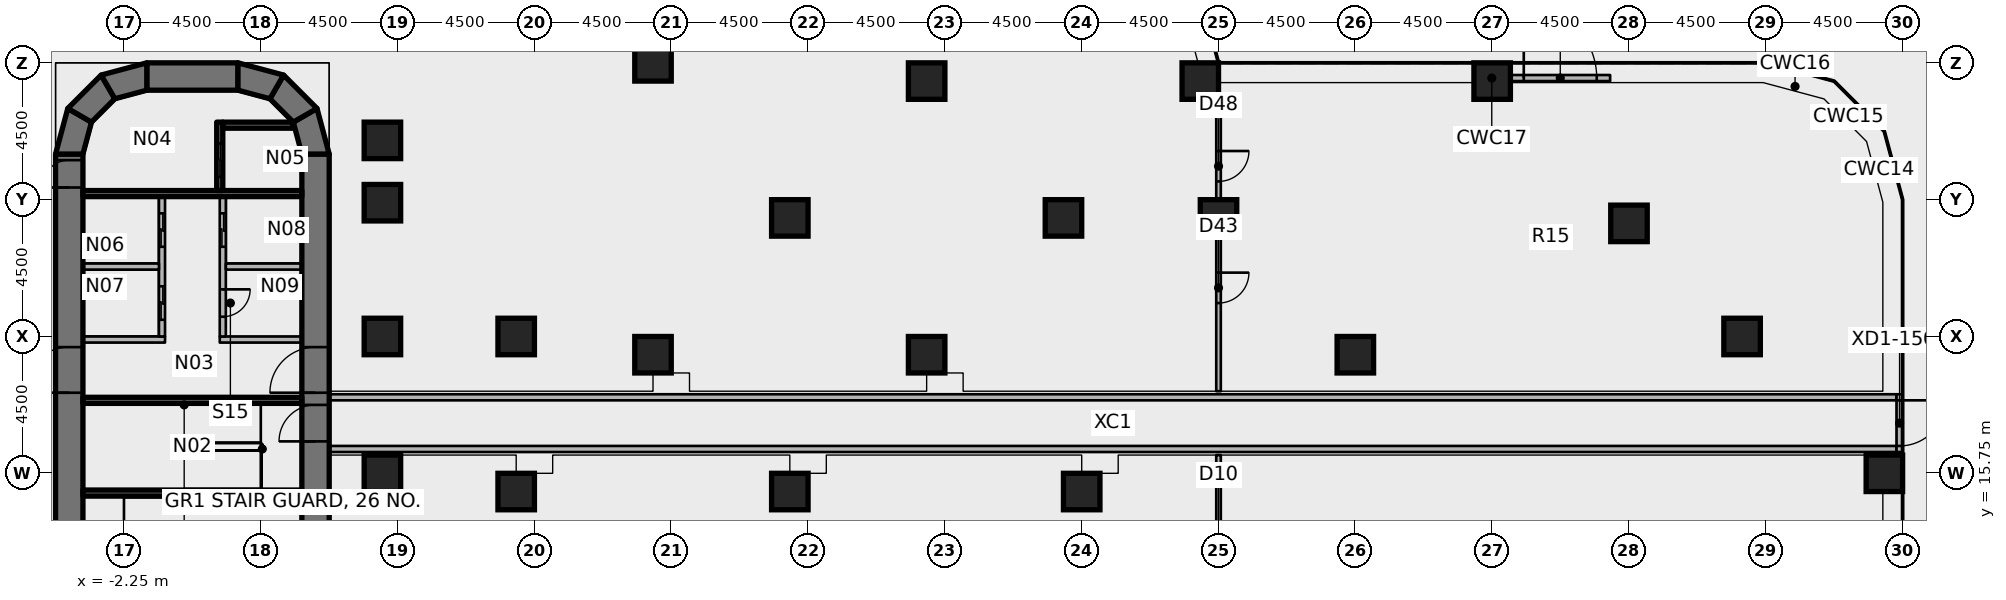
"""IFC4 building model, lengths in metres.
Left out: names, types, materials, properties, quantities, classifications, styles, units other than length and angle.
Written with IfcOpenShell. Run it as: python <this file> out.ifc"""

import sys

from ifc_helpers import new_model, si_unit, direction, frame, frame_2d, origin, origin_2d, place, context, subcontext, project, spatial, polyline, rectangle, outline, extrude, element, fill, save


model = new_model("IFC4")
c1 = context("Model", 3, precision=1e-05, world=origin(), true_north=direction((0.0, 1.0)))
c2 = subcontext(c1, "Body", "Model", "MODEL_VIEW")
j1 = project(units=[si_unit("LENGTHUNIT", "METRE"), si_unit("PLANEANGLEUNIT", "RADIAN")], contexts=[c1])
p1 = place(None, origin())
s1 = spatial("IfcSite", under=j1, at=p1, CompositionType="ELEMENT")
p2 = place(p1, origin())
s2 = spatial("IfcBuilding", under=s1, at=p2, CompositionType="ELEMENT")
p3 = place(p2, origin())
s3 = spatial("IfcBuildingStorey", under=s2, at=p3, CompositionType="ELEMENT", Elevation=0.0)
for number, where, z_axis, x_axis in (
    (1, (6.25, 15.75, 0.0), (0.0, 0.0, 1.0), (1.0, 0.0, 0.0)),
    (2, (6.25, 20.25, 0.0), (0.0, 0.0, 1.0), (1.0, 0.0, 0.0)),
    (3, (6.25, 24.65, 0.0), (0.0, 0.0, 1.0), (1.0, 0.0, 0.0)),
    (4, (6.25, 26.7, 0.0), (0.0, 0.0, 1.0), (1.0, 0.0, 0.0)),
    (5, (10.65, 15.15, 0.0), (0.0, 0.0, 1.0), (1.0, 0.0, 0.0)),
    (6, (10.65, 20.25, 0.0), (0.0, 0.0, 1.0), (1.0, 0.0, 0.0)),
    (7, (15.15, 19.65, 0.0), (0.0, 0.0, 1.0), (1.0, 0.0, 0.0)),
    (8, (15.15, 29.25, 0.0), (0.0, 0.0, 1.0), (1.0, 0.0, 0.0)),
    (9, (19.65, 15.15, 0.0), (0.0, 0.0, 1.0), (1.0, 0.0, 0.0)),
    (10, (19.65, 24.15, 0.0), (0.0, 0.0, 1.0), (1.0, 0.0, 0.0)),
    (11, (24.15, 19.65, 0.0), (0.0, 0.0, 1.0), (1.0, 0.0, 0.0)),
    (12, (24.15, 28.65, 0.0), (0.0, 0.0, 1.0), (1.0, 0.0, 0.0)),
    (13, (29.25, 15.15, 0.0), (0.0, 0.0, 1.0), (1.0, 0.0, 0.0)),
    (14, (28.65, 24.15, 0.0), (0.0, 0.0, 1.0), (1.0, 0.0, 0.0)),
    (15, (33.75, 24.15, 0.0), (0.0, 0.0, 1.0), (1.0, 0.0, 0.0)),
    (16, (33.15, 28.65, 0.0), (0.0, 0.0, 1.0), (1.0, 0.0, 0.0)),
    (17, (38.25, 19.65, 0.0), (0.0, 0.0, 1.0), (1.0, 0.0, 0.0)),
    (18, (42.75, 28.65, 0.0), (0.0, 0.0, 1.0), (1.0, 0.0, 0.0)),
    (19, (47.25, 23.97, 0.0), (0.0, 0.0, 1.0), (1.0, 0.0, 0.0)),
    (20, (50.97, 20.25, 0.0), (0.0, 0.0, 1.0), (1.0, 0.0, 0.0)),
    (21, (55.65, 15.75, 0.0), (0.0, 0.0, 1.0), (1.0, 0.0, 0.0)),
):
    element("IfcColumn", number, at=place(p3, frame(where, z_axis=z_axis, x_axis=x_axis)), inside=s3, PredefinedType="COLUMN", context=c2, shape_type="SweptSolid", body=[
        extrude(rectangle(XDim=1.2, YDim=1.2, at=origin_2d()), origin(), (0.0, 0.0, 1.0), 6.55),
    ])
p4 = place(p3, frame((-4.05, 11.25, 0.0), z_axis=(0.0, 0.0, 1.0), x_axis=(0.0, 1.0, 0.0)))
e22 = element("IfcWall", 22, at=p4, inside=s3, PredefinedType="SHEAR", context=c2, shape_type="SweptSolid", body=[
    extrude(rectangle(XDim=15.0, YDim=0.9, at=frame_2d((7.5, 0.0))), origin(), (0.0, 0.0, 1.0), 7.0),
])
p5 = place(p4, frame((7.15, 0.0, 0.0)))
e23 = element("IfcOpeningElement", 23, at=p5, cuts=e22, PredefinedType="OPENING", context=c2, shape_type="SweptSolid", body=[
    extrude(rectangle(XDim=1.5, YDim=2.3, at=frame_2d((0.75, 1.15))), frame((0.0, 0.46, 0.0), z_axis=(0.0, -1.0, 0.0), x_axis=(1.0, 0.0, 0.0)), (0.0, 0.0, 1.0), 0.92),
])
p6 = place(p4, frame((13.9, 0.0, 0.0)))
e24 = element("IfcOpeningElement", 24, at=p6, cuts=e22, PredefinedType="OPENING", context=c2, shape_type="SweptSolid", body=[
    extrude(rectangle(XDim=0.9, YDim=2.1, at=frame_2d((0.45, 1.05))), frame((0.0, 0.46, 0.0), z_axis=(0.0, -1.0, 0.0), x_axis=(1.0, 0.0, 0.0)), (0.0, 0.0, 1.0), 0.92),
])
p7 = place(p4, frame((1.15, 0.0, 0.0)))
e25 = element("IfcOpeningElement", 25, at=p7, cuts=e22, PredefinedType="OPENING", context=c2, shape_type="SweptSolid", body=[
    extrude(rectangle(XDim=1.2, YDim=2.1, at=frame_2d((0.6, 1.05))), frame((0.0, 0.46, 0.0), z_axis=(0.0, -1.0, 0.0), x_axis=(1.0, 0.0, 0.0)), (0.0, 0.0, 1.0), 0.92),
])
p8 = place(p3, frame((4.05, 11.25, 0.0), z_axis=(0.0, 0.0, 1.0), x_axis=(0.0, 1.0, 0.0)))
e26 = element("IfcWall", 26, at=p8, inside=s3, PredefinedType="SHEAR", context=c2, shape_type="SweptSolid", body=[
    extrude(rectangle(XDim=15.0, YDim=0.9, at=frame_2d((7.5, 0.0))), origin(), (0.0, 0.0, 1.0), 7.0),
])
p9 = place(p8, frame((7.15, 0.0, 0.0)))
e27 = element("IfcOpeningElement", 27, at=p9, cuts=e26, PredefinedType="OPENING", context=c2, shape_type="SweptSolid", body=[
    extrude(rectangle(XDim=1.5, YDim=2.3, at=frame_2d((0.75, 1.15))), frame((0.0, 0.46, 0.0), z_axis=(0.0, -1.0, 0.0), x_axis=(1.0, 0.0, 0.0)), (0.0, 0.0, 1.0), 0.92),
])
p10 = place(p8, frame((5.55, 0.0, 0.0)))
e28 = element("IfcOpeningElement", 28, at=p10, cuts=e26, PredefinedType="OPENING", context=c2, shape_type="SweptSolid", body=[
    extrude(rectangle(XDim=1.2, YDim=2.1, at=frame_2d((0.6, 1.05))), frame((0.0, 0.46, 0.0), z_axis=(0.0, -1.0, 0.0), x_axis=(1.0, 0.0, 0.0)), (0.0, 0.0, 1.0), 0.92),
])
p11 = place(p3, frame((-1.5, 28.8, 0.0), z_axis=(0.0, 0.0, 1.0), x_axis=(1.0, 0.0, 0.0)))
e29 = element("IfcWall", 29, at=p11, inside=s3, PredefinedType="SHEAR", context=c2, shape_type="SweptSolid", body=[
    extrude(rectangle(XDim=3.0, YDim=0.9, at=frame_2d((1.5, 0.0))), origin(), (0.0, 0.0, 1.0), 7.0),
])
p12 = place(p3, origin())
e30 = element("IfcWall", 30, at=p12, inside=s3, PredefinedType="SHEAR", context=c2, shape_type="SweptSolid", body=[
    extrude(outline(polyline([(-4.5, 26.25), (-4.098, 27.75), (-3.319, 27.3), (-3.6, 26.25), (-4.5, 26.25)])), origin(), (0.0, 0.0, 1.0), 7.0),
])
p13 = place(p3, origin())
e31 = element("IfcWall", 31, at=p13, inside=s3, PredefinedType="SHEAR", context=c2, shape_type="SweptSolid", body=[
    extrude(outline(polyline([(-4.098, 27.75), (-3.0, 28.848), (-2.55, 28.069), (-3.319, 27.3), (-4.098, 27.75)])), origin(), (0.0, 0.0, 1.0), 7.0),
])
p14 = place(p3, origin())
e32 = element("IfcWall", 32, at=p14, inside=s3, PredefinedType="SHEAR", context=c2, shape_type="SweptSolid", body=[
    extrude(outline(polyline([(-3.0, 28.848), (-1.5, 29.25), (-1.5, 28.35), (-2.55, 28.069), (-3.0, 28.848)])), origin(), (0.0, 0.0, 1.0), 7.0),
])
p15 = place(p3, origin())
e33 = element("IfcWall", 33, at=p15, inside=s3, PredefinedType="SHEAR", context=c2, shape_type="SweptSolid", body=[
    extrude(outline(polyline([(4.5, 26.25), (4.098, 27.75), (3.319, 27.3), (3.6, 26.25), (4.5, 26.25)])), origin(), (0.0, 0.0, 1.0), 7.0),
])
p16 = place(p3, origin())
e34 = element("IfcWall", 34, at=p16, inside=s3, PredefinedType="SHEAR", context=c2, shape_type="SweptSolid", body=[
    extrude(outline(polyline([(4.098, 27.75), (3.0, 28.848), (2.55, 28.069), (3.319, 27.3), (4.098, 27.75)])), origin(), (0.0, 0.0, 1.0), 7.0),
])
p17 = place(p3, origin())
e35 = element("IfcWall", 35, at=p17, inside=s3, PredefinedType="SHEAR", context=c2, shape_type="SweptSolid", body=[
    extrude(outline(polyline([(3.0, 28.848), (1.5, 29.25), (1.5, 28.35), (2.55, 28.069), (3.0, 28.848)])), origin(), (0.0, 0.0, 1.0), 7.0),
])
p18 = place(p3, frame((43.35, 28.75, 0.0), z_axis=(0.0, 0.0, 1.0), x_axis=(1.0, 0.0, 0.0)))
e36 = element("IfcWall", 36, at=p18, inside=s3, PredefinedType="SOLIDWALL", context=c2, shape_type="SweptSolid", body=[
    extrude(rectangle(XDim=3.28, YDim=0.2, at=frame_2d((1.64, 0.0))), origin(), (0.0, 0.0, 1.0), 5.6),
])
p19 = place(p18, frame((0.44, 0.0, 0.0)))
e37 = element("IfcOpeningElement", 37, at=p19, cuts=e36, PredefinedType="OPENING", context=c2, shape_type="SweptSolid", body=[
    extrude(rectangle(XDim=2.4, YDim=2.7, at=frame_2d((1.2, 1.35))), frame((0.0, 0.11, 0.0), z_axis=(0.0, -1.0, 0.0), x_axis=(1.0, 0.0, 0.0)), (0.0, 0.0, 1.0), 0.22),
])
p20 = place(p3, frame((-3.6, 24.95, 0.0), z_axis=(0.0, 0.0, 1.0), x_axis=(1.0, 0.0, 0.0)))
e38 = element("IfcWall", 38, at=p20, inside=s3, PredefinedType="SHEAR", context=c2, shape_type="SweptSolid", body=[
    extrude(rectangle(XDim=7.2, YDim=0.2, at=frame_2d((3.6, 0.0))), origin(), (0.0, 0.0, 1.0), 6.55),
])
p21 = place(p3, frame((0.9, 27.3, 0.0), z_axis=(0.0, 0.0, 1.0), x_axis=(0.0, -1.0, 0.0)))
e39 = element("IfcWall", 39, at=p21, inside=s3, PredefinedType="SHEAR", context=c2, shape_type="SweptSolid", body=[
    extrude(rectangle(XDim=2.25, YDim=0.2, at=frame_2d((1.125, 0.0))), origin(), (0.0, 0.0, 1.0), 6.55),
])
p22 = place(p21, frame((0.7, 0.0, 0.0)))
e40 = element("IfcOpeningElement", 40, at=p22, cuts=e39, PredefinedType="OPENING", context=c2, shape_type="SweptSolid", body=[
    extrude(rectangle(XDim=1.1, YDim=2.3, at=frame_2d((0.55, 1.15))), frame((0.0, 0.11, 0.0), z_axis=(0.0, -1.0, 0.0), x_axis=(1.0, 0.0, 0.0)), (0.0, 0.0, 1.0), 0.22),
])
p23 = place(p3, origin())
e41 = element("IfcWall", 41, at=p23, inside=s3, PredefinedType="SHEAR", context=c2, shape_type="SweptSolid", body=[
    extrude(outline(polyline([(1.0, 27.1), (3.341, 27.1), (3.291, 27.284), (3.275, 27.3), (1.0, 27.3), (1.0, 27.1)])), origin(), (0.0, 0.0, 1.0), 6.55),
])
for number, where, z_axis, x_axis in (
    (42, (-3.6, 18.15, 0.0), (0.0, 0.0, 1.0), (1.0, 0.0, 0.0)),
    (43, (-3.6, 15.1, 0.0), (0.0, 0.0, 1.0), (1.0, 0.0, 0.0)),
):
    element("IfcWall", number, at=place(p3, frame(where, z_axis=z_axis, x_axis=x_axis)), inside=s3, PredefinedType="SHEAR", context=c2, shape_type="SweptSolid", body=[
        extrude(rectangle(XDim=7.2, YDim=0.2, at=frame_2d((3.6, 0.0))), origin(), (0.0, 0.0, 1.0), 6.55),
    ])
p24 = place(p3, frame((-3.6, 20.15, 0.0), z_axis=(0.0, 0.0, 1.0), x_axis=(1.0, 0.0, 0.0)))
e44 = element("IfcWall", 44, at=p24, inside=s3, PredefinedType="PARTITIONING", context=c2, shape_type="SweptSolid", body=[
    extrude(rectangle(XDim=2.7, YDim=0.2, at=frame_2d((1.35, 0.0))), origin(), (0.0, 0.0, 1.0), 6.55),
])
p25 = place(p3, frame((-1.0, 24.85, 0.0), z_axis=(0.0, 0.0, 1.0), x_axis=(0.0, -1.0, 0.0)))
e45 = element("IfcWall", 45, at=p25, inside=s3, PredefinedType="PARTITIONING", context=c2, shape_type="SweptSolid", body=[
    extrude(rectangle(XDim=4.6, YDim=0.2, at=frame_2d((2.3, 0.0))), origin(), (0.0, 0.0, 1.0), 6.55),
])
p26 = place(p25, frame((0.55, 0.0, 0.0)))
e46 = element("IfcOpeningElement", 46, at=p26, cuts=e45, PredefinedType="OPENING", context=c2, shape_type="SweptSolid", body=[
    extrude(rectangle(XDim=1.1, YDim=2.3, at=frame_2d((0.55, 1.15))), frame((0.0, 0.11, 0.0), z_axis=(0.0, -1.0, 0.0), x_axis=(1.0, 0.0, 0.0)), (0.0, 0.0, 1.0), 0.22),
])
p27 = place(p25, frame((2.95, 0.0, 0.0)))
e47 = element("IfcOpeningElement", 47, at=p27, cuts=e45, PredefinedType="OPENING", context=c2, shape_type="SweptSolid", body=[
    extrude(rectangle(XDim=1.1, YDim=2.3, at=frame_2d((0.55, 1.15))), frame((0.0, 0.11, 0.0), z_axis=(0.0, -1.0, 0.0), x_axis=(1.0, 0.0, 0.0)), (0.0, 0.0, 1.0), 0.22),
])
p28 = place(p3, frame((0.9, 20.15, 0.0), z_axis=(0.0, 0.0, 1.0), x_axis=(1.0, 0.0, 0.0)))
e48 = element("IfcWall", 48, at=p28, inside=s3, PredefinedType="PARTITIONING", context=c2, shape_type="SweptSolid", body=[
    extrude(rectangle(XDim=2.7, YDim=0.2, at=frame_2d((1.35, 0.0))), origin(), (0.0, 0.0, 1.0), 6.55),
])
p29 = place(p3, frame((1.0, 24.85, 0.0), z_axis=(0.0, 0.0, 1.0), x_axis=(0.0, -1.0, 0.0)))
e49 = element("IfcWall", 49, at=p29, inside=s3, PredefinedType="PARTITIONING", context=c2, shape_type="SweptSolid", body=[
    extrude(rectangle(XDim=4.6, YDim=0.2, at=frame_2d((2.3, 0.0))), origin(), (0.0, 0.0, 1.0), 6.55),
])
p30 = place(p29, frame((0.55, 0.0, 0.0)))
e50 = element("IfcOpeningElement", 50, at=p30, cuts=e49, PredefinedType="OPENING", context=c2, shape_type="SweptSolid", body=[
    extrude(rectangle(XDim=1.1, YDim=2.3, at=frame_2d((0.55, 1.15))), frame((0.0, 0.11, 0.0), z_axis=(0.0, -1.0, 0.0), x_axis=(1.0, 0.0, 0.0)), (0.0, 0.0, 1.0), 0.22),
])
p31 = place(p29, frame((3.05, 0.0, 0.0)))
e51 = element("IfcOpeningElement", 51, at=p31, cuts=e49, PredefinedType="OPENING", context=c2, shape_type="SweptSolid", body=[
    extrude(rectangle(XDim=0.9, YDim=2.1, at=frame_2d((0.45, 1.05))), frame((0.0, 0.11, 0.0), z_axis=(0.0, -1.0, 0.0), x_axis=(1.0, 0.0, 0.0)), (0.0, 0.0, 1.0), 0.22),
])
for number, where, z_axis, x_axis in (
    (52, (-3.6, 22.55, 0.0), (0.0, 0.0, 1.0), (1.0, 0.0, 0.0)),
    (53, (1.1, 22.55, 0.0), (0.0, 0.0, 1.0), (1.0, 0.0, 0.0)),
):
    element("IfcWall", number, at=place(p3, frame(where, z_axis=z_axis, x_axis=x_axis)), inside=s3, PredefinedType="PARTITIONING", context=c2, shape_type="SweptSolid", body=[
        extrude(rectangle(XDim=2.5, YDim=0.2, at=frame_2d((1.25, 0.0))), origin(), (0.0, 0.0, 1.0), 6.55),
    ])
for number, where, z_axis, x_axis in (
    (54, (4.5, 18.25, 0.0), (0.0, 0.0, 1.0), (1.0, 0.0, 0.0)),
    (55, (4.5, 16.55, 0.0), (0.0, 0.0, 1.0), (1.0, 0.0, 0.0)),
):
    element("IfcWall", number, at=place(p3, frame(where, z_axis=z_axis, x_axis=x_axis)), inside=s3, PredefinedType="PARTITIONING", context=c2, shape_type="SweptSolid", body=[
        extrude(rectangle(XDim=51.55, YDim=0.2, at=frame_2d((25.775, 0.0))), origin(), (0.0, 0.0, 1.0), 6.55),
    ])
p32 = place(p3, frame((56.15, 18.35, 0.0), z_axis=(0.0, 0.0, 1.0), x_axis=(0.0, -1.0, 0.0)))
e56 = element("IfcWall", 56, at=p32, inside=s3, PredefinedType="PARTITIONING", context=c2, shape_type="SweptSolid", body=[
    extrude(rectangle(XDim=1.9, YDim=0.2, at=frame_2d((0.95, 0.0))), origin(), (0.0, 0.0, 1.0), 6.55),
])
p33 = place(p32, frame((0.2, 0.0, 0.0)))
e57 = element("IfcOpeningElement", 57, at=p33, cuts=e56, PredefinedType="OPENING", context=c2, shape_type="SweptSolid", body=[
    extrude(rectangle(XDim=1.5, YDim=2.1, at=frame_2d((0.75, 1.05))), frame((0.0, 0.11, 0.0), z_axis=(0.0, -1.0, 0.0), x_axis=(1.0, 0.0, 0.0)), (0.0, 0.0, 1.0), 0.22),
])
p34 = place(p3, frame((33.75, 23.55, 0.0), z_axis=(0.0, 0.0, 1.0), x_axis=(0.0, -1.0, 0.0)))
e58 = element("IfcWall", 58, at=p34, inside=s3, PredefinedType="PARTITIONING", context=c2, shape_type="SweptSolid", body=[
    extrude(rectangle(XDim=5.1, YDim=0.15, at=frame_2d((2.55, 0.0))), origin(), (0.0, 0.0, 1.0), 6.55),
])
p35 = place(p34, frame((1.2, 0.0, 0.0)))
e59 = element("IfcOpeningElement", 59, at=p35, cuts=e58, PredefinedType="OPENING", context=c2, shape_type="SweptSolid", body=[
    extrude(rectangle(XDim=1.0, YDim=2.1, at=frame_2d((0.5, 1.05))), frame((0.0, 0.085, 0.0), z_axis=(0.0, -1.0, 0.0), x_axis=(1.0, 0.0, 0.0)), (0.0, 0.0, 1.0), 0.17),
])
p36 = place(p3, frame((33.75, 28.05, 0.0), z_axis=(0.0, 0.0, 1.0), x_axis=(0.0, -1.0, 0.0)))
e60 = element("IfcWall", 60, at=p36, inside=s3, PredefinedType="PARTITIONING", context=c2, shape_type="SweptSolid", body=[
    extrude(rectangle(XDim=3.3, YDim=0.15, at=frame_2d((1.65, 0.0))), origin(), (0.0, 0.0, 1.0), 6.55),
])
p37 = place(p36, frame((1.7, 0.0, 0.0)))
e61 = element("IfcOpeningElement", 61, at=p37, cuts=e60, PredefinedType="OPENING", context=c2, shape_type="SweptSolid", body=[
    extrude(rectangle(XDim=1.0, YDim=2.1, at=frame_2d((0.5, 1.05))), frame((0.0, 0.085, 0.0), z_axis=(0.0, -1.0, 0.0), x_axis=(1.0, 0.0, 0.0)), (0.0, 0.0, 1.0), 0.17),
])
p38 = place(p3, frame((33.75, 16.35, 0.0), z_axis=(0.0, 0.0, 1.0), x_axis=(0.0, -1.0, 0.0)))
e62 = element("IfcWall", 62, at=p38, inside=s3, PredefinedType="PARTITIONING", context=c2, shape_type="SweptSolid", body=[
    extrude(rectangle(XDim=5.28, YDim=0.15, at=frame_2d((2.64, 0.0))), origin(), (0.0, 0.0, 1.0), 6.55),
])
p39 = place(p38, frame((2.19, 0.0, 0.0)))
e63 = element("IfcOpeningElement", 63, at=p39, cuts=e62, PredefinedType="OPENING", context=c2, shape_type="SweptSolid", body=[
    extrude(rectangle(XDim=0.9, YDim=2.1, at=frame_2d((0.45, 1.05))), frame((0.0, 0.085, 0.0), z_axis=(0.0, -1.0, 0.0), x_axis=(1.0, 0.0, 0.0)), (0.0, 0.0, 1.0), 0.17),
])
p40 = place(p19, origin())
e64 = element("IfcDoor", 64, at=p40, inside=s3, OperationType="SINGLE_SWING_LEFT", PredefinedType="DOOR", context=c2, shape_type="SweptSolid", body=[
    extrude(rectangle(XDim=2.4, YDim=2.7, at=frame_2d((1.2, 1.35))), frame((0.0, 0.025, 0.0), z_axis=(0.0, -1.0, 0.0), x_axis=(1.0, 0.0, 0.0)), (0.0, 0.0, 1.0), 0.05),
])
fill(e37, e64)
p41 = place(p5, origin())
e65 = element("IfcDoor", 65, at=p41, inside=s3, OperationType="DOUBLE_DOOR_SINGLE_SWING", PredefinedType="DOOR", context=c2, shape_type="SweptSolid", body=[
    extrude(rectangle(XDim=1.5, YDim=2.3, at=frame_2d((0.75, 1.15))), frame((0.0, 0.025, 0.0), z_axis=(0.0, -1.0, 0.0), x_axis=(1.0, 0.0, 0.0)), (0.0, 0.0, 1.0), 0.05),
])
fill(e23, e65)
p42 = place(p9, origin())
e66 = element("IfcDoor", 66, at=p42, inside=s3, OperationType="DOUBLE_DOOR_SINGLE_SWING", PredefinedType="DOOR", context=c2, shape_type="SweptSolid", body=[
    extrude(rectangle(XDim=1.5, YDim=2.3, at=frame_2d((0.75, 1.15))), frame((0.0, 0.025, 0.0), z_axis=(0.0, -1.0, 0.0), x_axis=(1.0, 0.0, 0.0)), (0.0, 0.0, 1.0), 0.05),
])
fill(e27, e66)
p43 = place(p6, origin())
e67 = element("IfcDoor", 67, at=p43, inside=s3, OperationType="SINGLE_SWING_LEFT", PredefinedType="DOOR", context=c2, shape_type="SweptSolid", body=[
    extrude(rectangle(XDim=0.9, YDim=2.1, at=frame_2d((0.45, 1.05))), frame((0.0, 0.025, 0.0), z_axis=(0.0, -1.0, 0.0), x_axis=(1.0, 0.0, 0.0)), (0.0, 0.0, 1.0), 0.05),
])
fill(e24, e67)
p44 = place(p10, origin())
e68 = element("IfcDoor", 68, at=p44, inside=s3, OperationType="SINGLE_SWING_RIGHT", PredefinedType="DOOR", context=c2, shape_type="SweptSolid", body=[
    extrude(rectangle(XDim=1.2, YDim=2.1, at=frame_2d((0.6, 1.05))), frame((0.0, 0.025, 0.0), z_axis=(0.0, -1.0, 0.0), x_axis=(1.0, 0.0, 0.0)), (0.0, 0.0, 1.0), 0.05),
])
fill(e28, e68)
p45 = place(p22, origin())
e69 = element("IfcDoor", 69, at=p45, inside=s3, OperationType="DOUBLE_DOOR_SLIDING", PredefinedType="DOOR", context=c2, shape_type="SweptSolid", body=[
    extrude(rectangle(XDim=1.1, YDim=2.3, at=frame_2d((0.55, 1.15))), frame((0.0, 0.025, 0.0), z_axis=(0.0, -1.0, 0.0), x_axis=(1.0, 0.0, 0.0)), (0.0, 0.0, 1.0), 0.05),
])
fill(e40, e69)
p46 = place(p26, origin())
e70 = element("IfcDoor", 70, at=p46, inside=s3, OperationType="DOUBLE_DOOR_SLIDING", PredefinedType="DOOR", context=c2, shape_type="SweptSolid", body=[
    extrude(rectangle(XDim=1.1, YDim=2.3, at=frame_2d((0.55, 1.15))), frame((0.0, 0.025, 0.0), z_axis=(0.0, -1.0, 0.0), x_axis=(1.0, 0.0, 0.0)), (0.0, 0.0, 1.0), 0.05),
])
fill(e46, e70)
p47 = place(p27, origin())
e71 = element("IfcDoor", 71, at=p47, inside=s3, OperationType="DOUBLE_DOOR_SLIDING", PredefinedType="DOOR", context=c2, shape_type="SweptSolid", body=[
    extrude(rectangle(XDim=1.1, YDim=2.3, at=frame_2d((0.55, 1.15))), frame((0.0, 0.025, 0.0), z_axis=(0.0, -1.0, 0.0), x_axis=(1.0, 0.0, 0.0)), (0.0, 0.0, 1.0), 0.05),
])
fill(e47, e71)
p48 = place(p30, origin())
e72 = element("IfcDoor", 72, at=p48, inside=s3, OperationType="DOUBLE_DOOR_SLIDING", PredefinedType="DOOR", context=c2, shape_type="SweptSolid", body=[
    extrude(rectangle(XDim=1.1, YDim=2.3, at=frame_2d((0.55, 1.15))), frame((0.0, 0.025, 0.0), z_axis=(0.0, -1.0, 0.0), x_axis=(1.0, 0.0, 0.0)), (0.0, 0.0, 1.0), 0.05),
])
fill(e50, e72)
p49 = place(p31, origin())
e73 = element("IfcDoor", 73, at=p49, inside=s3, OperationType="SINGLE_SWING_RIGHT", PredefinedType="DOOR", context=c2, shape_type="SweptSolid", body=[
    extrude(rectangle(XDim=0.9, YDim=2.1, at=frame_2d((0.45, 1.05))), frame((0.0, 0.025, 0.0), z_axis=(0.0, -1.0, 0.0), x_axis=(1.0, 0.0, 0.0)), (0.0, 0.0, 1.0), 0.05),
])
fill(e51, e73)
p50 = place(p33, origin())
e74 = element("IfcDoor", 74, at=p50, inside=s3, OperationType="DOUBLE_DOOR_DOUBLE_SWING", PredefinedType="DOOR", context=c2, shape_type="SweptSolid", body=[
    extrude(rectangle(XDim=1.5, YDim=2.1, at=frame_2d((0.75, 1.05))), frame((0.0, 0.025, 0.0), z_axis=(0.0, -1.0, 0.0), x_axis=(1.0, 0.0, 0.0)), (0.0, 0.0, 1.0), 0.05),
])
fill(e57, e74)
p51 = place(p35, origin())
e75 = element("IfcDoor", 75, at=p51, inside=s3, OperationType="SINGLE_SWING_LEFT", PredefinedType="DOOR", context=c2, shape_type="SweptSolid", body=[
    extrude(rectangle(XDim=1.0, YDim=2.1, at=frame_2d((0.5, 1.05))), frame((0.0, 0.025, 0.0), z_axis=(0.0, -1.0, 0.0), x_axis=(1.0, 0.0, 0.0)), (0.0, 0.0, 1.0), 0.05),
])
fill(e59, e75)
p52 = place(p37, origin())
e76 = element("IfcDoor", 76, at=p52, inside=s3, OperationType="SINGLE_SWING_LEFT", PredefinedType="DOOR", context=c2, shape_type="SweptSolid", body=[
    extrude(rectangle(XDim=1.0, YDim=2.1, at=frame_2d((0.5, 1.05))), frame((0.0, 0.025, 0.0), z_axis=(0.0, -1.0, 0.0), x_axis=(1.0, 0.0, 0.0)), (0.0, 0.0, 1.0), 0.05),
])
fill(e61, e76)
save(model, sys.argv[1])
